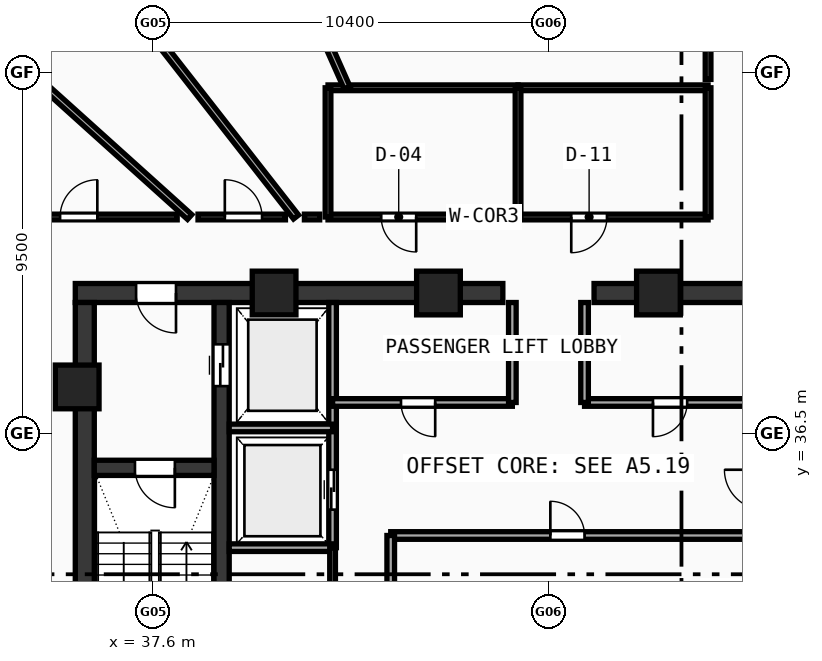
"""IFC4 building model, lengths in metres.
Left out: names, types, materials, properties, quantities, classifications, styles, units other than length and angle.
Written with IfcOpenShell. Run it as: python <this file> out.ifc"""

import sys

from ifc_helpers import new_model, si_unit, direction, frame, frame_2d, origin, origin_with_axes, origin_2d, place, context, subcontext, project, spatial, rectangle, hollow_rectangle, extrude, source, transform, mapped, element, fill, save


model = new_model("IFC4")
c1 = context("Model", 3, precision=1e-05, world=origin(), true_north=direction((0.0, 1.0)))
c2 = subcontext(c1, "Body", "Model", "MODEL_VIEW")
j1 = project(units=[si_unit("LENGTHUNIT", "METRE"), si_unit("PLANEANGLEUNIT", "RADIAN")], contexts=[c1])
p1 = place(None, origin())
s1 = spatial("IfcSite", under=j1, at=p1, CompositionType="ELEMENT")
p2 = place(p1, origin())
s2 = spatial("IfcBuilding", under=s1, at=p2, CompositionType="ELEMENT")
p3 = place(p2, frame((0.0, 0.0, 307.4)))
s3 = spatial("IfcBuildingStorey", under=s2, at=p3, CompositionType="ELEMENT", Elevation=307.4)
p4 = place(p3, frame((35.55, 40.2, 0.0), z_axis=(0.0, 0.0, 1.0), x_axis=(1.0, 0.0, 0.0)))
e1 = element("IfcWall", 1, at=p4, inside=s3, PredefinedType="SHEAR", context=c2, shape_type="SweptSolid", body=[
    extrude(rectangle(XDim=11.25, YDim=0.5, at=frame_2d((5.625, 0.0))), origin(), (0.0, 0.0, 1.0), 3.47),
])
p5 = place(p4, frame((1.6, 0.0, 0.0)))
e2 = element("IfcOpeningElement", 2, at=p5, cuts=e1, PredefinedType="OPENING", context=c2, shape_type="SweptSolid", body=[
    extrude(rectangle(XDim=1.05, YDim=2.1, at=frame_2d((0.525, 1.05))), frame((0.0, 0.26, 0.0), z_axis=(0.0, -1.0, 0.0), x_axis=(1.0, 0.0, 0.0)), (0.0, 0.0, 1.0), 0.52),
])
p6 = place(p3, frame((49.2, 40.2, 0.0), z_axis=(0.0, 0.0, 1.0), x_axis=(1.0, 0.0, 0.0)))
e3 = element("IfcWall", 3, at=p6, inside=s3, PredefinedType="SHEAR", context=c2, shape_type="SweptSolid", body=[
    extrude(rectangle(XDim=11.25, YDim=0.5, at=frame_2d((5.625, 0.0))), origin(), (0.0, 0.0, 1.0), 3.47),
])
p7 = place(p6, frame((8.6, 0.0, 0.0)))
e4 = element("IfcOpeningElement", 4, at=p7, cuts=e3, PredefinedType="OPENING", context=c2, shape_type="SweptSolid", body=[
    extrude(rectangle(XDim=1.05, YDim=2.1, at=frame_2d((0.525, 1.05))), frame((0.0, 0.26, 0.0), z_axis=(0.0, -1.0, 0.0), x_axis=(1.0, 0.0, 0.0)), (0.0, 0.0, 1.0), 0.52),
])
p8 = place(p3, frame((35.8, 27.75, 0.0), z_axis=(0.0, 0.0, 1.0), x_axis=(0.0, 1.0, 0.0)))
e5 = element("IfcWall", 5, at=p8, inside=s3, PredefinedType="SHEAR", context=c2, shape_type="SweptSolid", body=[
    extrude(rectangle(XDim=12.2, YDim=0.5, at=frame_2d((6.1, 0.0))), origin(), (0.0, 0.0, 1.0), 3.47),
])
p9 = place(p3, frame((39.4, 27.75, 0.0), z_axis=(0.0, 0.0, 1.0), x_axis=(0.0, 1.0, 0.0)))
e6 = element("IfcWall", 6, at=p9, inside=s3, PredefinedType="SHEAR", context=c2, shape_type="SweptSolid", body=[
    extrude(rectangle(XDim=12.2, YDim=0.4, at=frame_2d((6.1, 0.0))), origin(), (0.0, 0.0, 1.0), 3.47),
])
p10 = place(p9, frame((10.0, 0.0, 0.0)))
e7 = element("IfcOpeningElement", 7, at=p10, cuts=e6, PredefinedType="OPENING", context=c2, shape_type="SweptSolid", body=[
    extrude(rectangle(XDim=1.1, YDim=2.1, at=frame_2d((0.55, 1.05))), frame((0.0, 0.21, 0.0), z_axis=(0.0, -1.0, 0.0), x_axis=(1.0, 0.0, 0.0)), (0.0, 0.0, 1.0), 0.42),
])
p11 = place(p3, frame((36.05, 35.6, 0.0), z_axis=(0.0, 0.0, 1.0), x_axis=(1.0, 0.0, 0.0)))
e8 = element("IfcWall", 8, at=p11, inside=s3, PredefinedType="SHEAR", context=c2, shape_type="SweptSolid", body=[
    extrude(rectangle(XDim=3.15, YDim=0.4, at=frame_2d((1.575, 0.0))), origin(), (0.0, 0.0, 1.0), 3.47),
])
p12 = place(p11, frame((1.07, 0.0, 0.0)))
e9 = element("IfcOpeningElement", 9, at=p12, cuts=e8, PredefinedType="OPENING", context=c2, shape_type="SweptSolid", body=[
    extrude(rectangle(XDim=1.05, YDim=2.1, at=frame_2d((0.525, 1.05))), frame((0.0, 0.21, 0.0), z_axis=(0.0, -1.0, 0.0), x_axis=(1.0, 0.0, 0.0)), (0.0, 0.0, 1.0), 0.42),
])
m1 = source(origin(), c2, "Body", "SweptSolid", [
    extrude(hollow_rectangle(XDim=1.15, YDim=1.15, WallThickness=0.048, at=origin_2d()), origin(), (0.0, 0.0, 1.0), 3.73),
])
for number, where, z_axis, x_axis in (
    (10, (50.894, 40.2, -0.26), (0.0, 0.0, 1.0), (1.0, 0.0, 0.0)),
    (11, (45.106, 40.2, -0.26), (0.0, 0.0, 1.0), (1.0, 0.0, 0.0)),
    (12, (40.781, 40.2, -0.26), (0.0, 0.0, 1.0), (1.0, 0.0, 0.0)),
    (13, (35.6, 37.729, -0.26), (0.0, 0.0, 1.0), (1.0, 0.0, 0.0)),
):
    element("IfcColumn", number, at=place(p3, frame(where, z_axis=z_axis, x_axis=x_axis)), inside=s3, PredefinedType="COLUMN", context=c2, shape_type="MappedRepresentation", body=[
        mapped(m1, transform((0.0, 0.0, 0.0), scale=1.0)),
    ])
p13 = place(p3, frame((42.32, 33.5, 0.0), z_axis=(0.0, 0.0, 1.0), x_axis=(0.0, 1.0, 0.0)))
e14 = element("IfcWall", 14, at=p13, inside=s3, PredefinedType="SOLIDWALL", context=c2, shape_type="SweptSolid", body=[
    extrude(rectangle(XDim=6.45, YDim=0.2, at=frame_2d((3.225, 0.0))), origin(), (0.0, 0.0, 1.0), 3.47),
])
p14 = place(p13, frame((1.0, 0.0, 0.0)))
e15 = element("IfcOpeningElement", 15, at=p14, cuts=e14, PredefinedType="OPENING", context=c2, shape_type="SweptSolid", body=[
    extrude(rectangle(XDim=1.05, YDim=2.1, at=frame_2d((0.525, 1.05))), frame((0.0, 0.11, 0.0), z_axis=(0.0, -1.0, 0.0), x_axis=(1.0, 0.0, 0.0)), (0.0, 0.0, 1.0), 0.22),
])
for number, where, z_axis, x_axis in (
    (16, (39.6, 36.65, 0.0), (0.0, 0.0, 1.0), (1.0, 0.0, 0.0)),
    (17, (39.6, 33.5, 0.0), (0.0, 0.0, 1.0), (1.0, 0.0, 0.0)),
):
    element("IfcWall", number, at=place(p3, frame(where, z_axis=z_axis, x_axis=x_axis)), inside=s3, PredefinedType="SOLIDWALL", context=c2, shape_type="SweptSolid", body=[
        extrude(rectangle(XDim=2.72, YDim=0.2, at=frame_2d((1.36, 0.0))), origin(), (0.0, 0.0, 1.0), 3.47),
    ])
p15 = place(p3, frame((42.32, 37.32, 0.0), z_axis=(0.0, 0.0, 1.0), x_axis=(1.0, 0.0, 0.0)))
e18 = element("IfcWall", 18, at=p15, inside=s3, PredefinedType="SOLIDWALL", context=c2, shape_type="SweptSolid", body=[
    extrude(rectangle(XDim=4.73, YDim=0.2, at=frame_2d((2.365, 0.0))), origin(), (0.0, 0.0, 1.0), 3.47),
])
p16 = place(p15, frame((1.8, 0.0, 0.0)))
e19 = element("IfcOpeningElement", 19, at=p16, cuts=e18, PredefinedType="OPENING", context=c2, shape_type="SweptSolid", body=[
    extrude(rectangle(XDim=0.9, YDim=2.1, at=frame_2d((0.45, 1.05))), frame((0.0, 0.11, 0.0), z_axis=(0.0, -1.0, 0.0), x_axis=(1.0, 0.0, 0.0)), (0.0, 0.0, 1.0), 0.22),
])
p17 = place(p3, frame((48.95, 37.32, 0.0), z_axis=(0.0, 0.0, 1.0), x_axis=(1.0, 0.0, 0.0)))
e20 = element("IfcWall", 20, at=p17, inside=s3, PredefinedType="SOLIDWALL", context=c2, shape_type="SweptSolid", body=[
    extrude(rectangle(XDim=4.73, YDim=0.2, at=frame_2d((2.365, 0.0))), origin(), (0.0, 0.0, 1.0), 3.47),
])
p18 = place(p17, frame((1.8, 0.0, 0.0)))
e21 = element("IfcOpeningElement", 21, at=p18, cuts=e20, PredefinedType="OPENING", context=c2, shape_type="SweptSolid", body=[
    extrude(rectangle(XDim=0.9, YDim=2.1, at=frame_2d((0.45, 1.05))), frame((0.0, 0.11, 0.0), z_axis=(0.0, -1.0, 0.0), x_axis=(1.0, 0.0, 0.0)), (0.0, 0.0, 1.0), 0.22),
])
for number, where, z_axis, x_axis in (
    (22, (47.05, 37.32, 0.0), (0.0, 0.0, 1.0), (0.0, 1.0, 0.0)),
    (23, (48.95, 37.32, 0.0), (0.0, 0.0, 1.0), (0.0, 1.0, 0.0)),
):
    element("IfcWall", number, at=place(p3, frame(where, z_axis=z_axis, x_axis=x_axis)), inside=s3, PredefinedType="SOLIDWALL", context=c2, shape_type="SweptSolid", body=[
        extrude(rectangle(XDim=2.63, YDim=0.2, at=frame_2d((1.315, 0.0))), origin(), (0.0, 0.0, 1.0), 3.47),
    ])
p19 = place(p3, frame((43.85, 33.82, 0.0), z_axis=(0.0, 0.0, 1.0), x_axis=(1.0, 0.0, 0.0)))
e24 = element("IfcWall", 24, at=p19, inside=s3, PredefinedType="SOLIDWALL", context=c2, shape_type="SweptSolid", body=[
    extrude(rectangle(XDim=9.83, YDim=0.2, at=frame_2d((4.915, 0.0))), origin(), (0.0, 0.0, 1.0), 3.47),
])
p20 = place(p19, frame((4.2, 0.0, 0.0)))
e25 = element("IfcOpeningElement", 25, at=p20, cuts=e24, PredefinedType="OPENING", context=c2, shape_type="SweptSolid", body=[
    extrude(rectangle(XDim=0.9, YDim=2.1, at=frame_2d((0.45, 1.05))), frame((0.0, 0.11, 0.0), z_axis=(0.0, -1.0, 0.0), x_axis=(1.0, 0.0, 0.0)), (0.0, 0.0, 1.0), 0.22),
])
p21 = place(p3, frame((43.85, 27.6, 0.0), z_axis=(0.0, 0.0, 1.0), x_axis=(0.0, 1.0, 0.0)))
e26 = element("IfcWall", 26, at=p21, inside=s3, PredefinedType="SOLIDWALL", context=c2, shape_type="SweptSolid", body=[
    extrude(rectangle(XDim=6.22, YDim=0.2, at=frame_2d((3.11, 0.0))), origin(), (0.0, 0.0, 1.0), 3.47),
])
p22 = place(p21, frame((2.25, 0.0, 0.0)))
e27 = element("IfcOpeningElement", 27, at=p22, cuts=e26, PredefinedType="OPENING", context=c2, shape_type="SweptSolid", body=[
    extrude(rectangle(XDim=1.05, YDim=2.1, at=frame_2d((0.525, 1.05))), frame((0.0, 0.11, 0.0), z_axis=(0.0, -1.0, 0.0), x_axis=(1.0, 0.0, 0.0)), (0.0, 0.0, 1.0), 0.22),
])
p23 = place(p3, frame((42.32, 27.6, 0.0), z_axis=(0.0, 0.0, 1.0), x_axis=(0.0, 1.0, 0.0)))
e28 = element("IfcWall", 28, at=p23, inside=s3, PredefinedType="PARTITIONING", context=c2, shape_type="SweptSolid", body=[
    extrude(rectangle(XDim=5.9, YDim=0.15, at=frame_2d((2.95, 0.0))), origin(), (0.0, 0.0, 1.0), 3.47),
])
p24 = place(p23, frame((3.2, 0.0, 0.0)))
e29 = element("IfcOpeningElement", 29, at=p24, cuts=e28, PredefinedType="OPENING", context=c2, shape_type="SweptSolid", body=[
    extrude(rectangle(XDim=0.94, YDim=2.1, at=frame_2d((0.47, 1.05))), frame((0.0, 0.085, 0.0), z_axis=(0.0, -1.0, 0.0), x_axis=(1.0, 0.0, 0.0)), (0.0, 0.0, 1.0), 0.17),
])
p25 = place(p3, frame((42.2, 42.2, 0.0), z_axis=(0.0, 0.0, 1.0), x_axis=(1.0, 0.0, 0.0)))
e30 = element("IfcWall", 30, at=p25, inside=s3, PredefinedType="PARTITIONING", context=c2, shape_type="SweptSolid", body=[
    extrude(rectangle(XDim=5.0, YDim=0.15, at=frame_2d((2.5, 0.0))), origin(), (0.0, 0.0, 1.0), 2.87),
])
p26 = place(p25, frame((1.4, 0.0, 0.0)))
e31 = element("IfcOpeningElement", 31, at=p26, cuts=e30, PredefinedType="OPENING", context=c2, shape_type="SweptSolid", body=[
    extrude(rectangle(XDim=0.92, YDim=2.1, at=frame_2d((0.46, 1.05))), frame((0.0, 0.085, 0.0), z_axis=(0.0, -1.0, 0.0), x_axis=(1.0, 0.0, 0.0)), (0.0, 0.0, 1.0), 0.17),
])
p27 = place(p3, frame((42.2, 45.6, 0.0), z_axis=(0.0, 0.0, 1.0), x_axis=(1.0, 0.0, 0.0)))
e32 = element("IfcWall", 32, at=p27, inside=s3, PredefinedType="PARTITIONING", context=c2, shape_type="SweptSolid", body=[
    extrude(rectangle(XDim=5.0, YDim=0.15, at=frame_2d((2.5, 0.0))), origin(), (0.0, 0.0, 1.0), 2.87),
])
p28 = place(p3, frame((42.2, 42.2, 0.0), z_axis=(0.0, 0.0, 1.0), x_axis=(0.0, 1.0, 0.0)))
e33 = element("IfcWall", 33, at=p28, inside=s3, PredefinedType="PARTITIONING", context=c2, shape_type="SweptSolid", body=[
    extrude(rectangle(XDim=3.4, YDim=0.15, at=frame_2d((1.7, 0.0))), origin(), (0.0, 0.0, 1.0), 3.47),
])
p29 = place(p3, frame((47.2, 42.2, 0.0), z_axis=(0.0, 0.0, 1.0), x_axis=(1.0, 0.0, 0.0)))
e34 = element("IfcWall", 34, at=p29, inside=s3, PredefinedType="PARTITIONING", context=c2, shape_type="SweptSolid", body=[
    extrude(rectangle(XDim=5.0, YDim=0.15, at=frame_2d((2.5, 0.0))), origin(), (0.0, 0.0, 1.0), 2.87),
])
p30 = place(p29, frame((1.4, 0.0, 0.0)))
e35 = element("IfcOpeningElement", 35, at=p30, cuts=e34, PredefinedType="OPENING", context=c2, shape_type="SweptSolid", body=[
    extrude(rectangle(XDim=0.94, YDim=2.1, at=frame_2d((0.47, 1.05))), frame((0.0, 0.085, 0.0), z_axis=(0.0, -1.0, 0.0), x_axis=(1.0, 0.0, 0.0)), (0.0, 0.0, 1.0), 0.17),
])
p31 = place(p3, frame((47.2, 45.6, 0.0), z_axis=(0.0, 0.0, 1.0), x_axis=(1.0, 0.0, 0.0)))
e36 = element("IfcWall", 36, at=p31, inside=s3, PredefinedType="PARTITIONING", context=c2, shape_type="SweptSolid", body=[
    extrude(rectangle(XDim=5.0, YDim=0.15, at=frame_2d((2.5, 0.0))), origin(), (0.0, 0.0, 1.0), 3.47),
])
p32 = place(p3, frame((47.2, 42.2, 0.0), z_axis=(0.0, 0.0, 1.0), x_axis=(0.0, 1.0, 0.0)))
e37 = element("IfcWall", 37, at=p32, inside=s3, PredefinedType="PARTITIONING", context=c2, shape_type="SweptSolid", body=[
    extrude(rectangle(XDim=3.4, YDim=0.15, at=frame_2d((1.7, 0.0))), origin(), (0.0, 0.0, 1.0), 3.47),
])
p33 = place(p3, frame((52.2, 42.2, 0.0), z_axis=(0.0, 0.0, 1.0), x_axis=(0.0, 1.0, 0.0)))
e38 = element("IfcWall", 38, at=p33, inside=s3, PredefinedType="PARTITIONING", context=c2, shape_type="SweptSolid", body=[
    extrude(rectangle(XDim=3.4, YDim=0.15, at=frame_2d((1.7, 0.0))), origin(), (0.0, 0.0, 1.0), 2.87),
])
p34 = place(p3, frame((42.702, 45.6, 0.0), z_axis=(0.0, 0.0, 1.0), x_axis=(-0.406747233578, 0.913540742374, 0.0)))
e39 = element("IfcWall", 39, at=p34, inside=s3, PredefinedType="PARTITIONING", context=c2, shape_type="SweptSolid", body=[
    extrude(rectangle(XDim=18.602, YDim=0.17, at=frame_2d((9.301, 0.0))), origin(), (0.0, 0.0, 1.0), 2.87),
])
p35 = place(p3, frame((41.359, 42.2, 0.0), z_axis=(0.0, 0.0, 1.0), x_axis=(-0.615656448173, 0.788014681223, 0.0)))
e40 = element("IfcWall", 40, at=p35, inside=s3, PredefinedType="PARTITIONING", context=c2, shape_type="SweptSolid", body=[
    extrude(rectangle(XDim=17.185, YDim=0.17, at=frame_2d((8.592, 0.0))), origin(), (0.0, 0.0, 1.0), 2.87),
])
p36 = place(p3, frame((38.56, 42.2, 0.0), z_axis=(0.0, 0.0, 1.0), x_axis=(-0.74314439151, 0.669131088329, 0.0)))
e41 = element("IfcWall", 41, at=p36, inside=s3, PredefinedType="PARTITIONING", context=c2, shape_type="SweptSolid", body=[
    extrude(rectangle(XDim=14.026, YDim=0.17, at=frame_2d((7.013, 0.0))), origin(), (0.0, 0.0, 1.0), 2.87),
])
p37 = place(p3, frame((33.15, 42.2, 0.0), z_axis=(0.0, 0.0, 1.0), x_axis=(1.0, 0.0, 0.0)))
e42 = element("IfcWall", 42, at=p37, inside=s3, PredefinedType="PARTITIONING", context=c2, shape_type="SweptSolid", body=[
    extrude(rectangle(XDim=5.081, YDim=0.15, at=frame_2d((2.541, 0.0))), origin(), (0.0, 0.0, 1.0), 3.12),
])
p38 = place(p37, frame((2.0, 0.0, 0.0)))
e43 = element("IfcOpeningElement", 43, at=p38, cuts=e42, PredefinedType="OPENING", context=c2, shape_type="SweptSolid", body=[
    extrude(rectangle(XDim=0.98, YDim=2.12, at=frame_2d((0.49, 1.06))), frame((0.0, 0.085, 0.0), z_axis=(0.0, -1.0, 0.0), x_axis=(1.0, 0.0, 0.0)), (0.0, 0.0, 1.0), 0.17),
])
p39 = place(p3, frame((38.78, 42.2, 0.0), z_axis=(0.0, 0.0, 1.0), x_axis=(1.0, 0.0, 0.0)))
e44 = element("IfcWall", 44, at=p39, inside=s3, PredefinedType="PARTITIONING", context=c2, shape_type="SweptSolid", body=[
    extrude(rectangle(XDim=2.3, YDim=0.15, at=frame_2d((1.15, 0.0))), origin(), (0.0, 0.0, 1.0), 2.87),
])
p40 = place(p39, frame((0.705, 0.0, 0.0)))
e45 = element("IfcOpeningElement", 45, at=p40, cuts=e44, PredefinedType="OPENING", context=c2, shape_type="SweptSolid", body=[
    extrude(rectangle(XDim=0.98, YDim=2.12, at=frame_2d((0.49, 1.06))), frame((0.0, 0.085, 0.0), z_axis=(0.0, -1.0, 0.0), x_axis=(1.0, 0.0, 0.0)), (0.0, 0.0, 1.0), 0.17),
])
p41 = place(p3, frame((41.579, 42.2, 0.0), z_axis=(0.0, 0.0, 1.0), x_axis=(1.0, 0.0, 0.0)))
e46 = element("IfcWall", 46, at=p41, inside=s3, PredefinedType="PARTITIONING", context=c2, shape_type="SweptSolid", body=[
    extrude(rectangle(XDim=0.401, YDim=0.15, at=frame_2d((0.201, 0.0))), origin(), (0.0, 0.0, 1.0), 3.47),
])
p42 = place(p3, frame((52.2, 45.82, 0.0), z_axis=(0.0, 0.0, 1.0), x_axis=(0.0, 1.0, 0.0)))
e47 = element("IfcWall", 47, at=p42, inside=s3, PredefinedType="PARTITIONING", context=c2, shape_type="SweptSolid", body=[
    extrude(rectangle(XDim=5.18, YDim=0.15, at=frame_2d((2.59, 0.0))), origin(), (0.0, 0.0, 1.0), 3.12),
])
p43 = place(p42, frame((2.235, 0.0, 0.0)))
e48 = element("IfcOpeningElement", 48, at=p43, cuts=e47, PredefinedType="OPENING", context=c2, shape_type="SweptSolid", body=[
    extrude(rectangle(XDim=0.98, YDim=2.12, at=frame_2d((0.49, 1.06))), frame((0.0, 0.085, 0.0), z_axis=(0.0, -1.0, 0.0), x_axis=(1.0, 0.0, 0.0)), (0.0, 0.0, 1.0), 0.17),
])
m2 = source(origin(), c2, "Body", "SweptSolid", [
    extrude(rectangle(XDim=1.05, YDim=2.1, at=frame_2d((0.525, 1.05))), frame((0.0, 0.025, 0.0), z_axis=(0.0, -1.0, 0.0), x_axis=(1.0, 0.0, 0.0)), (0.0, 0.0, 1.0), 0.05),
])
p44 = place(p12, frame((1.05, 0.0, 0.0), z_axis=(0.0, 0.0, 1.0), x_axis=(-1.0, 0.0, 0.0)))
e49 = element("IfcDoor", 49, at=p44, inside=s3, OperationType="SINGLE_SWING_LEFT", PredefinedType="DOOR", context=c2, shape_type="MappedRepresentation", body=[
    mapped(m2, transform((0.0, 0.0, 0.0), scale=1.0)),
])
fill(e9, e49)
p45 = place(p5, frame((1.05, 0.0, 0.0), z_axis=(0.0, 0.0, 1.0), x_axis=(-1.0, 0.0, 0.0)))
e50 = element("IfcDoor", 50, at=p45, inside=s3, OperationType="SINGLE_SWING_LEFT", PredefinedType="DOOR", context=c2, shape_type="MappedRepresentation", body=[
    mapped(m2, transform((0.0, 0.0, 0.0), scale=1.0)),
])
fill(e2, e50)
m3 = source(origin(), c2, "Body", "SweptSolid", [
    extrude(rectangle(XDim=1.1, YDim=2.1, at=frame_2d((0.55, 1.05))), frame((0.0, 0.025, 0.0), z_axis=(0.0, -1.0, 0.0), x_axis=(1.0, 0.0, 0.0)), (0.0, 0.0, 1.0), 0.05),
])
p46 = place(p10, frame((1.1, 0.0, 0.0), z_axis=(0.0, 0.0, 1.0), x_axis=(-1.0, 0.0, 0.0)))
e51 = element("IfcDoor", 51, at=p46, inside=s3, OperationType="DOUBLE_DOOR_SLIDING", PredefinedType="DOOR", context=c2, shape_type="MappedRepresentation", body=[
    mapped(m3, transform((0.0, 0.0, 0.0), scale=1.0)),
])
fill(e7, e51)
p47 = place(p14, origin_with_axes())
e52 = element("IfcDoor", 52, at=p47, inside=s3, OperationType="DOUBLE_DOOR_SLIDING", PredefinedType="DOOR", context=c2, shape_type="MappedRepresentation", body=[
    mapped(m2, transform((0.0, 0.0, 0.0), scale=1.0)),
])
fill(e15, e52)
m4 = source(origin(), c2, "Body", "SweptSolid", [
    extrude(rectangle(XDim=0.9, YDim=2.1, at=frame_2d((0.45, 1.05))), frame((0.0, 0.025, 0.0), z_axis=(0.0, -1.0, 0.0), x_axis=(1.0, 0.0, 0.0)), (0.0, 0.0, 1.0), 0.05),
])
p48 = place(p16, frame((0.9, 0.0, 0.0), z_axis=(0.0, 0.0, 1.0), x_axis=(-1.0, 0.0, 0.0)))
e53 = element("IfcDoor", 53, at=p48, inside=s3, OperationType="SINGLE_SWING_LEFT", PredefinedType="DOOR", context=c2, shape_type="MappedRepresentation", body=[
    mapped(m4, transform((0.0, 0.0, 0.0), scale=1.0)),
])
fill(e19, e53)
p49 = place(p18, frame((0.9, 0.0, 0.0), z_axis=(0.0, 0.0, 1.0), x_axis=(-1.0, 0.0, 0.0)))
e54 = element("IfcDoor", 54, at=p49, inside=s3, OperationType="SINGLE_SWING_RIGHT", PredefinedType="DOOR", context=c2, shape_type="MappedRepresentation", body=[
    mapped(m4, transform((0.0, 0.0, 0.0), scale=1.0)),
])
fill(e21, e54)
p50 = place(p20, origin_with_axes())
e55 = element("IfcDoor", 55, at=p50, inside=s3, OperationType="SINGLE_SWING_LEFT", PredefinedType="DOOR", context=c2, shape_type="MappedRepresentation", body=[
    mapped(m4, transform((0.0, 0.0, 0.0), scale=1.0)),
])
fill(e25, e55)
m5 = source(origin(), c2, "Body", "SweptSolid", [
    extrude(rectangle(XDim=0.92, YDim=2.1, at=frame_2d((0.46, 1.05))), frame((0.0, 0.025, 0.0), z_axis=(0.0, -1.0, 0.0), x_axis=(1.0, 0.0, 0.0)), (0.0, 0.0, 1.0), 0.05),
])
p51 = place(p26, frame((0.92, 0.0, 0.0), z_axis=(0.0, 0.0, 1.0), x_axis=(-1.0, 0.0, 0.0)))
e56 = element("IfcDoor", 56, at=p51, inside=s3, OperationType="SINGLE_SWING_LEFT", PredefinedType="DOOR", context=c2, shape_type="MappedRepresentation", body=[
    mapped(m5, transform((0.0, 0.0, 0.0), scale=1.0)),
])
fill(e31, e56)
m6 = source(origin(), c2, "Body", "SweptSolid", [
    extrude(rectangle(XDim=0.94, YDim=2.1, at=frame_2d((0.47, 1.05))), frame((0.0, 0.025, 0.0), z_axis=(0.0, -1.0, 0.0), x_axis=(1.0, 0.0, 0.0)), (0.0, 0.0, 1.0), 0.05),
])
p52 = place(p30, frame((0.94, 0.0, 0.0), z_axis=(0.0, 0.0, 1.0), x_axis=(-1.0, 0.0, 0.0)))
e57 = element("IfcDoor", 57, at=p52, inside=s3, OperationType="SINGLE_SWING_RIGHT", PredefinedType="DOOR", context=c2, shape_type="MappedRepresentation", body=[
    mapped(m6, transform((0.0, 0.0, 0.0), scale=1.0)),
])
fill(e35, e57)
m7 = source(origin(), c2, "Body", "SweptSolid", [
    extrude(rectangle(XDim=0.98, YDim=2.12, at=frame_2d((0.49, 1.06))), frame((0.0, 0.025, 0.0), z_axis=(0.0, -1.0, 0.0), x_axis=(1.0, 0.0, 0.0)), (0.0, 0.0, 1.0), 0.05),
])
p53 = place(p40, origin_with_axes())
e58 = element("IfcDoor", 58, at=p53, inside=s3, OperationType="SINGLE_SWING_LEFT", PredefinedType="DOOR", context=c2, shape_type="MappedRepresentation", body=[
    mapped(m7, transform((0.0, 0.0, 0.0), scale=1.0)),
])
fill(e45, e58)
p54 = place(p38, origin_with_axes())
e59 = element("IfcDoor", 59, at=p54, inside=s3, OperationType="SINGLE_SWING_RIGHT", PredefinedType="DOOR", context=c2, shape_type="MappedRepresentation", body=[
    mapped(m7, transform((0.0, 0.0, 0.0), scale=1.0)),
])
fill(e43, e59)
save(model, sys.argv[1])
